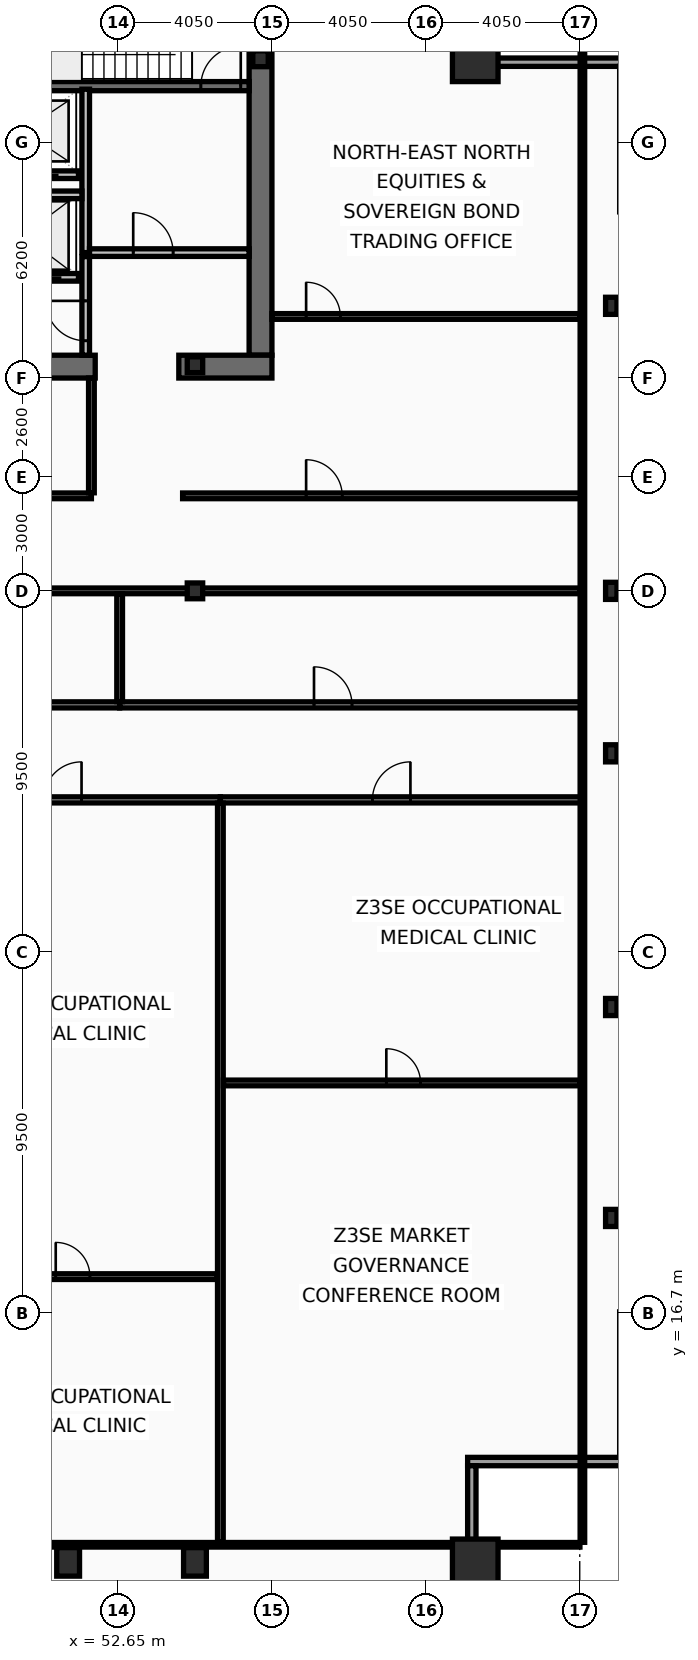
"""IFC4 building model, lengths in metres.
Left out: names, types, materials, properties, quantities, classifications, styles, units other than length and angle.
Written with IfcOpenShell. Run it as: python <this file> out.ifc"""

import sys

from ifc_helpers import new_model, si_unit, direction, frame, frame_2d, origin, origin_2d, place, context, subcontext, project, spatial, rectangle, hollow_rectangle, i_section, extrude, element, fill, save


model = new_model("IFC4")
c1 = context("Model", 3, precision=1e-05, world=origin(), true_north=direction((0.0, 1.0)))
c2 = subcontext(c1, "Body", "Model", "MODEL_VIEW")
j1 = project(units=[si_unit("LENGTHUNIT", "METRE"), si_unit("PLANEANGLEUNIT", "RADIAN")], contexts=[c1])
p1 = place(None, origin())
s1 = spatial("IfcSite", under=j1, at=p1, CompositionType="ELEMENT")
p2 = place(p1, origin())
s2 = spatial("IfcBuilding", under=s1, at=p2, CompositionType="ELEMENT")
p3 = place(p2, frame((0.0, 0.0, 221.0)))
s3 = spatial("IfcBuildingStorey", under=s2, at=p3, CompositionType="ELEMENT", Elevation=221.0)
p4 = place(p3, frame((56.4, 53.1, 0.0), z_axis=(0.0, 0.0, 1.0), x_axis=(0.0, -1.0, 0.0)))
e1 = element("IfcWall", 1, at=p4, inside=s3, PredefinedType="SHEAR", context=c2, shape_type="SweptSolid", body=[
    extrude(rectangle(XDim=11.2, YDim=0.6, at=frame_2d((5.6, 0.0))), origin(), (0.0, 0.0, 1.0), 3.44),
])
p5 = place(p3, frame((52.05, 41.6, 0.0), z_axis=(0.0, 0.0, 1.0), x_axis=(-1.0, 0.0, 0.0)))
e2 = element("IfcWall", 2, at=p5, inside=s3, PredefinedType="SHEAR", context=c2, shape_type="SweptSolid", body=[
    extrude(rectangle(XDim=11.3, YDim=0.6, at=frame_2d((5.65, 0.0))), origin(), (0.0, 0.0, 1.0), 3.44),
])
p6 = place(p3, frame((56.7, 41.6, 0.0), z_axis=(0.0, 0.0, 1.0), x_axis=(-1.0, 0.0, 0.0)))
e3 = element("IfcWall", 3, at=p6, inside=s3, PredefinedType="SHEAR", context=c2, shape_type="SweptSolid", body=[
    extrude(rectangle(XDim=2.45, YDim=0.6, at=frame_2d((1.225, 0.0))), origin(), (0.0, 0.0, 1.0), 3.44),
])
p7 = place(p3, frame((48.63, 48.98, 0.0), z_axis=(0.0, 0.0, 1.0), x_axis=(1.0, 0.0, 0.0)))
e4 = element("IfcWall", 4, at=p7, inside=s3, PredefinedType="SHEAR", context=c2, shape_type="SweptSolid", body=[
    extrude(rectangle(XDim=7.47, YDim=0.24, at=frame_2d((3.735, 0.0))), origin(), (0.0, 0.0, 1.0), 3.44),
])
p8 = place(p7, frame((6.2, 0.0, 0.0)))
e5 = element("IfcOpeningElement", 5, at=p8, cuts=e4, PredefinedType="OPENING", context=c2, shape_type="SweptSolid", body=[
    extrude(rectangle(XDim=1.05, YDim=2.15, at=frame_2d((0.525, 1.075))), frame((0.0, 0.13, 0.0), z_axis=(0.0, -1.0, 0.0), x_axis=(1.0, 0.0, 0.0)), (0.0, 0.0, 1.0), 0.26),
])
for number, where, z_axis, x_axis in (
    (6, (62.05, 10.15, 0.0), (0.0, 0.0, 1.0), (1.0, 0.0, 0.0)),
    (7, (62.05, 49.7, 0.0), (0.0, 0.0, 1.0), (1.0, 0.0, 0.0)),
):
    element("IfcColumn", number, at=place(p3, frame(where, z_axis=z_axis, x_axis=x_axis)), inside=s3, PredefinedType="COLUMN", context=c2, shape_type="SweptSolid", body=[
        extrude(hollow_rectangle(XDim=1.2, YDim=1.2, WallThickness=0.06, at=origin_2d()), origin(), (0.0, 0.0, 1.0), 3.6),
    ])
for number, where, z_axis, x_axis in (
    (8, (51.337, 10.15, 0.0), (0.0, 0.0, 1.0), (1.0, 0.0, 0.0)),
    (9, (54.675, 10.15, 0.0), (0.0, 0.0, 1.0), (1.0, 0.0, 0.0)),
):
    element("IfcColumn", number, at=place(p3, frame(where, z_axis=z_axis, x_axis=x_axis)), inside=s3, PredefinedType="COLUMN", context=c2, shape_type="SweptSolid", body=[
        extrude(hollow_rectangle(XDim=0.6, YDim=0.75, WallThickness=0.045, at=origin_2d()), origin(), (0.0, 0.0, 1.0), 3.6),
    ])
for number, where, z_axis, x_axis in (
    (10, (65.63, 19.2, 0.0), (0.0, 0.0, 1.0), (1.0, 0.0, 0.0)),
    (11, (65.63, 24.75, 0.0), (0.0, 0.0, 1.0), (1.0, 0.0, 0.0)),
    (12, (65.63, 31.425, 0.0), (0.0, 0.0, 1.0), (1.0, 0.0, 0.0)),
    (13, (65.63, 35.7, 0.0), (0.0, 0.0, 1.0), (1.0, 0.0, 0.0)),
    (14, (65.63, 43.2, 0.0), (0.0, 0.0, 1.0), (1.0, 0.0, 0.0)),
):
    element("IfcColumn", number, at=place(p3, frame(where, z_axis=z_axis, x_axis=x_axis)), inside=s3, PredefinedType="COLUMN", context=c2, shape_type="SweptSolid", body=[
        extrude(i_section(OverallWidth=0.3, OverallDepth=0.45, WebThickness=0.014, FlangeThickness=0.026, at=origin_2d()), origin(), (0.0, 0.0, 1.0), 3.6),
    ])
for number, where, z_axis, x_axis in (
    (15, (56.4, 49.7, 0.0), (0.0, 0.0, 1.0), (1.0, 0.0, 0.0)),
    (16, (54.675, 35.7, 0.0), (0.0, 0.0, 1.0), (1.0, 0.0, 0.0)),
    (17, (54.675, 41.65, 0.0), (0.0, 0.0, 1.0), (1.0, 0.0, 0.0)),
):
    element("IfcColumn", number, at=place(p3, frame(where, z_axis=z_axis, x_axis=x_axis)), inside=s3, PredefinedType="COLUMN", context=c2, shape_type="SweptSolid", body=[
        extrude(i_section(OverallWidth=0.406, OverallDepth=0.416, WebThickness=0.03, FlangeThickness=0.048, at=origin_2d()), origin(), (0.0, 0.0, 1.0), 3.6),
    ])
p9 = place(p3, frame((61.96, 53.63, 0.0), z_axis=(0.0, 0.0, 1.0), x_axis=(0.0, -1.0, 0.0)))
e18 = element("IfcWall", 18, at=p9, inside=s3, PredefinedType="SOLIDWALL", context=c2, shape_type="SweptSolid", body=[
    extrude(rectangle(XDim=3.91, YDim=0.22, at=frame_2d((1.955, 0.0))), origin(), (0.0, 0.0, 1.0), 2.83),
])
for number, where, z_axis, x_axis in (
    (19, (61.85, 49.61, 0.0), (0.0, 0.0, 1.0), (1.0, 0.0, 0.0)),
    (20, (66.07, 12.79, 0.0), (0.0, 0.0, 1.0), (-1.0, 0.0, 0.0)),
):
    element("IfcWall", number, at=place(p3, frame(where, z_axis=z_axis, x_axis=x_axis)), inside=s3, PredefinedType="SOLIDWALL", context=c2, shape_type="SweptSolid", body=[
        extrude(rectangle(XDim=4.22, YDim=0.22, at=frame_2d((2.11, 0.0))), origin(), (0.0, 0.0, 1.0), 2.83),
    ])
p10 = place(p3, frame((61.96, 12.68, 0.0), z_axis=(0.0, 0.0, 1.0), x_axis=(0.0, -1.0, 0.0)))
e21 = element("IfcWall", 21, at=p10, inside=s3, PredefinedType="SOLIDWALL", context=c2, shape_type="SweptSolid", body=[
    extrude(rectangle(XDim=3.91, YDim=0.22, at=frame_2d((1.955, 0.0))), origin(), (0.0, 0.0, 1.0), 2.83),
])
p11 = place(p3, frame((51.61, 43.95, 0.0), z_axis=(0.0, 0.0, 1.0), x_axis=(-1.0, 0.0, 0.0)))
e22 = element("IfcWall", 22, at=p11, inside=s3, PredefinedType="PARTITIONING", context=c2, shape_type="SweptSolid", body=[
    extrude(rectangle(XDim=2.92, YDim=0.2, at=frame_2d((1.46, 0.0))), origin(), (0.0, 0.0, 1.0), 3.44),
])
p12 = place(p11, frame((0.81, 0.0, 0.0)))
e23 = element("IfcOpeningElement", 23, at=p12, cuts=e22, PredefinedType="OPENING", context=c2, shape_type="SweptSolid", body=[
    extrude(rectangle(XDim=1.3, YDim=2.18, at=frame_2d((0.65, 1.09))), frame((0.0, 0.11, 0.0), z_axis=(0.0, -1.0, 0.0), x_axis=(1.0, 0.0, 0.0)), (0.0, 0.0, 1.0), 0.22),
])
p13 = place(p3, frame((51.61, 46.65, 0.0), z_axis=(0.0, 0.0, 1.0), x_axis=(-1.0, 0.0, 0.0)))
e24 = element("IfcWall", 24, at=p13, inside=s3, PredefinedType="PARTITIONING", context=c2, shape_type="SweptSolid", body=[
    extrude(rectangle(XDim=2.92, YDim=0.2, at=frame_2d((1.46, 0.0))), origin(), (0.0, 0.0, 1.0), 3.44),
])
p14 = place(p13, frame((0.86, 0.0, 0.0)))
e25 = element("IfcOpeningElement", 25, at=p14, cuts=e24, PredefinedType="OPENING", context=c2, shape_type="SweptSolid", body=[
    extrude(rectangle(XDim=1.2, YDim=2.18, at=frame_2d((0.6, 1.09))), frame((0.0, 0.11, 0.0), z_axis=(0.0, -1.0, 0.0), x_axis=(1.0, 0.0, 0.0)), (0.0, 0.0, 1.0), 0.22),
])
p15 = place(p3, frame((51.8, 44.6, 0.0), z_axis=(0.0, 0.0, 1.0), x_axis=(0.0, 1.0, 0.0)))
e26 = element("IfcWall", 26, at=p15, inside=s3, PredefinedType="PARTITIONING", context=c2, shape_type="SweptSolid", body=[
    extrude(rectangle(XDim=4.3, YDim=0.2, at=frame_2d((2.15, 0.0))), origin(), (0.0, 0.0, 1.0), 3.44),
])
p16 = place(p3, frame((51.9, 44.6, 0.0), z_axis=(0.0, 0.0, 1.0), x_axis=(1.0, 0.0, 0.0)))
e27 = element("IfcWall", 27, at=p16, inside=s3, PredefinedType="PARTITIONING", context=c2, shape_type="SweptSolid", body=[
    extrude(rectangle(XDim=4.2, YDim=0.2, at=frame_2d((2.1, 0.0))), origin(), (0.0, 0.0, 1.0), 3.44),
])
p17 = place(p16, frame((1.15, 0.0, 0.0)))
e28 = element("IfcOpeningElement", 28, at=p17, cuts=e27, PredefinedType="OPENING", context=c2, shape_type="SweptSolid", body=[
    extrude(rectangle(XDim=1.05, YDim=2.15, at=frame_2d((0.525, 1.075))), frame((0.0, 0.11, 0.0), z_axis=(0.0, -1.0, 0.0), x_axis=(1.0, 0.0, 0.0)), (0.0, 0.0, 1.0), 0.22),
])
p18 = place(p3, frame((48.63, 46.12, 0.0), z_axis=(0.0, 0.0, 1.0), x_axis=(1.0, 0.0, 0.0)))
e29 = element("IfcWall", 29, at=p18, inside=s3, PredefinedType="PARTITIONING", context=c2, shape_type="SweptSolid", body=[
    extrude(rectangle(XDim=3.07, YDim=0.2, at=frame_2d((1.535, 0.0))), origin(), (0.0, 0.0, 1.0), 3.44),
])
p19 = place(p3, frame((51.8, 41.9, 0.0), z_axis=(0.0, 0.0, 1.0), x_axis=(0.0, 1.0, 0.0)))
e30 = element("IfcWall", 30, at=p19, inside=s3, PredefinedType="PARTITIONING", context=c2, shape_type="SweptSolid", body=[
    extrude(rectangle(XDim=2.595, YDim=0.2, at=frame_2d((1.298, 0.0))), origin(), (0.0, 0.0, 1.0), 3.44),
])
p20 = place(p19, frame((0.38, 0.0, 0.0)))
e31 = element("IfcOpeningElement", 31, at=p20, cuts=e30, PredefinedType="OPENING", context=c2, shape_type="SweptSolid", body=[
    extrude(rectangle(XDim=1.05, YDim=2.15, at=frame_2d((0.525, 1.075))), frame((0.0, 0.11, 0.0), z_axis=(0.0, -1.0, 0.0), x_axis=(1.0, 0.0, 0.0)), (0.0, 0.0, 1.0), 0.22),
])
p21 = place(p3, frame((47.8, 38.2, 0.0), z_axis=(0.0, 0.0, 1.0), x_axis=(1.0, 0.0, 0.0)))
e32 = element("IfcWall", 32, at=p21, inside=s3, PredefinedType="PARTITIONING", context=c2, shape_type="SweptSolid", body=[
    extrude(rectangle(XDim=4.15, YDim=0.15, at=frame_2d((2.075, 0.0))), origin(), (0.0, 0.0, 1.0), 2.78),
])
p22 = place(p21, frame((1.1, 0.0, 0.0)))
e33 = element("IfcOpeningElement", 33, at=p22, cuts=e32, PredefinedType="OPENING", context=c2, shape_type="SweptSolid", body=[
    extrude(rectangle(XDim=1.0, YDim=2.05, at=frame_2d((0.5, 1.025))), frame((0.0, 0.085, 0.0), z_axis=(0.0, -1.0, 0.0), x_axis=(1.0, 0.0, 0.0)), (0.0, 0.0, 1.0), 0.17),
])
p23 = place(p3, frame((51.95, 38.28, 0.0), z_axis=(0.0, 0.0, 1.0), x_axis=(0.0, 1.0, 0.0)))
e34 = element("IfcWall", 34, at=p23, inside=s3, PredefinedType="PARTITIONING", context=c2, shape_type="SweptSolid", body=[
    extrude(rectangle(XDim=3.02, YDim=0.15, at=frame_2d((1.51, 0.0))), origin(), (0.0, 0.0, 1.0), 3.44),
])
p24 = place(p3, frame((54.35, 38.2, 0.0), z_axis=(0.0, 0.0, 1.0), x_axis=(1.0, 0.0, 0.0)))
e35 = element("IfcWall", 35, at=p24, inside=s3, PredefinedType="PARTITIONING", context=c2, shape_type="SweptSolid", body=[
    extrude(rectangle(XDim=10.52, YDim=0.15, at=frame_2d((5.26, 0.0))), origin(), (0.0, 0.0, 1.0), 2.78),
])
p25 = place(p24, frame((3.25, 0.0, 0.0)))
e36 = element("IfcOpeningElement", 36, at=p25, cuts=e35, PredefinedType="OPENING", context=c2, shape_type="SweptSolid", body=[
    extrude(rectangle(XDim=0.95, YDim=2.05, at=frame_2d((0.475, 1.025))), frame((0.0, 0.085, 0.0), z_axis=(0.0, -1.0, 0.0), x_axis=(1.0, 0.0, 0.0)), (0.0, 0.0, 1.0), 0.17),
])
p26 = place(p3, frame((56.7, 42.92, 0.0), z_axis=(0.0, 0.0, 1.0), x_axis=(1.0, 0.0, 0.0)))
e37 = element("IfcWall", 37, at=p26, inside=s3, PredefinedType="PARTITIONING", context=c2, shape_type="SweptSolid", body=[
    extrude(rectangle(XDim=8.105, YDim=0.15, at=frame_2d((4.052, 0.0))), origin(), (0.0, 0.0, 1.0), 2.78),
])
p27 = place(p26, frame((0.9, 0.0, 0.0)))
e38 = element("IfcOpeningElement", 38, at=p27, cuts=e37, PredefinedType="OPENING", context=c2, shape_type="SweptSolid", body=[
    extrude(rectangle(XDim=0.9, YDim=2.05, at=frame_2d((0.45, 1.025))), frame((0.0, 0.085, 0.0), z_axis=(0.0, -1.0, 0.0), x_axis=(1.0, 0.0, 0.0)), (0.0, 0.0, 1.0), 0.17),
])
p28 = place(p3, frame((39.88, 35.7, 0.0), z_axis=(0.0, 0.0, 1.0), x_axis=(1.0, 0.0, 0.0)))
e39 = element("IfcWall", 39, at=p28, inside=s3, PredefinedType="PARTITIONING", context=c2, shape_type="SweptSolid", body=[
    extrude(rectangle(XDim=24.925, YDim=0.15, at=frame_2d((12.462, 0.0))), origin(), (0.0, 0.0, 1.0), 2.78),
])
p29 = place(p3, frame((47.321, 30.2, 0.0), z_axis=(0.0, 0.0, 1.0), x_axis=(1.0, 0.0, 0.0)))
e40 = element("IfcWall", 40, at=p29, inside=s3, PredefinedType="PARTITIONING", context=c2, shape_type="SweptSolid", body=[
    extrude(rectangle(XDim=8.022, YDim=0.16, at=frame_2d((4.011, 0.0))), origin(), (0.0, 0.0, 1.0), 2.78),
])
p30 = place(p29, frame((3.369, 0.0, 0.0)))
e41 = element("IfcOpeningElement", 41, at=p30, cuts=e40, PredefinedType="OPENING", context=c2, shape_type="SweptSolid", body=[
    extrude(rectangle(XDim=1.0, YDim=2.05, at=frame_2d((0.5, 1.025))), frame((0.0, 0.09, 0.0), z_axis=(0.0, -1.0, 0.0), x_axis=(1.0, 0.0, 0.0)), (0.0, 0.0, 1.0), 0.18),
])
p31 = place(p3, frame((47.401, 17.656, 0.0), z_axis=(0.0, 0.0, 1.0), x_axis=(1.0, 0.0, 0.0)))
e42 = element("IfcWall", 42, at=p31, inside=s3, PredefinedType="PARTITIONING", context=c2, shape_type="SweptSolid", body=[
    extrude(rectangle(XDim=7.863, YDim=0.15, at=frame_2d((3.931, 0.0))), origin(), (0.0, 0.0, 1.0), 2.78),
])
p32 = place(p31, frame((3.61, 0.0, 0.0)))
e43 = element("IfcOpeningElement", 43, at=p32, cuts=e42, PredefinedType="OPENING", context=c2, shape_type="SweptSolid", body=[
    extrude(rectangle(XDim=0.9, YDim=2.05, at=frame_2d((0.45, 1.025))), frame((0.0, 0.085, 0.0), z_axis=(0.0, -1.0, 0.0), x_axis=(1.0, 0.0, 0.0)), (0.0, 0.0, 1.0), 0.17),
])
p33 = place(p3, frame((55.344, 30.2, 0.0), z_axis=(0.0, 0.0, 1.0), x_axis=(1.0, 0.0, 0.0)))
e44 = element("IfcWall", 44, at=p33, inside=s3, PredefinedType="PARTITIONING", context=c2, shape_type="SweptSolid", body=[
    extrude(rectangle(XDim=9.527, YDim=0.16, at=frame_2d((4.763, 0.0))), origin(), (0.0, 0.0, 1.0), 3.44),
])
p34 = place(p33, frame((4.001, 0.0, 0.0)))
e45 = element("IfcOpeningElement", 45, at=p34, cuts=e44, PredefinedType="OPENING", context=c2, shape_type="SweptSolid", body=[
    extrude(rectangle(XDim=1.0, YDim=2.05, at=frame_2d((0.5, 1.025))), frame((0.0, 0.09, 0.0), z_axis=(0.0, -1.0, 0.0), x_axis=(1.0, 0.0, 0.0)), (0.0, 0.0, 1.0), 0.18),
])
p35 = place(p3, frame((55.344, 10.665, 0.0), z_axis=(0.0, 0.0, 1.0), x_axis=(0.0, 1.0, 0.0)))
e46 = element("IfcWall", 46, at=p35, inside=s3, PredefinedType="PARTITIONING", context=c2, shape_type="SweptSolid", body=[
    extrude(rectangle(XDim=19.45, YDim=0.15, at=frame_2d((9.725, 0.0))), origin(), (0.0, 0.0, 1.0), 2.78),
])
p36 = place(p3, frame((55.423, 22.752, 0.0), z_axis=(0.0, 0.0, 1.0), x_axis=(1.0, 0.0, 0.0)))
e47 = element("IfcWall", 47, at=p36, inside=s3, PredefinedType="PARTITIONING", context=c2, shape_type="SweptSolid", body=[
    extrude(rectangle(XDim=9.382, YDim=0.15, at=frame_2d((4.691, 0.0))), origin(), (0.0, 0.0, 1.0), 3.44),
])
p37 = place(p36, frame((4.287, 0.0, 0.0)))
e48 = element("IfcOpeningElement", 48, at=p37, cuts=e47, PredefinedType="OPENING", context=c2, shape_type="SweptSolid", body=[
    extrude(rectangle(XDim=0.9, YDim=2.05, at=frame_2d((0.45, 1.025))), frame((0.0, 0.085, 0.0), z_axis=(0.0, -1.0, 0.0), x_axis=(1.0, 0.0, 0.0)), (0.0, 0.0, 1.0), 0.17),
])
p38 = place(p3, frame((39.8, 32.7, 0.0), z_axis=(0.0, 0.0, 1.0), x_axis=(1.0, 0.0, 0.0)))
e49 = element("IfcWall", 49, at=p38, inside=s3, PredefinedType="PARTITIONING", context=c2, shape_type="SweptSolid", body=[
    extrude(rectangle(XDim=12.893, YDim=0.16, at=frame_2d((6.447, 0.0))), origin(), (0.0, 0.0, 1.0), 2.78),
])
p39 = place(p38, frame((5.415, 0.0, 0.0)))
e50 = element("IfcOpeningElement", 50, at=p39, cuts=e49, PredefinedType="OPENING", context=c2, shape_type="SweptSolid", body=[
    extrude(rectangle(XDim=1.0, YDim=2.05, at=frame_2d((0.5, 1.025))), frame((0.0, 0.09, 0.0), z_axis=(0.0, -1.0, 0.0), x_axis=(1.0, 0.0, 0.0)), (0.0, 0.0, 1.0), 0.18),
])
p40 = place(p3, frame((52.693, 32.7, 0.0), z_axis=(0.0, 0.0, 1.0), x_axis=(1.0, 0.0, 0.0)))
e51 = element("IfcWall", 51, at=p40, inside=s3, PredefinedType="PARTITIONING", context=c2, shape_type="SweptSolid", body=[
    extrude(rectangle(XDim=12.177, YDim=0.16, at=frame_2d((6.088, 0.0))), origin(), (0.0, 0.0, 1.0), 2.78),
])
p41 = place(p40, frame((5.114, 0.0, 0.0)))
e52 = element("IfcOpeningElement", 52, at=p41, cuts=e51, PredefinedType="OPENING", context=c2, shape_type="SweptSolid", body=[
    extrude(rectangle(XDim=1.0, YDim=2.05, at=frame_2d((0.5, 1.025))), frame((0.0, 0.09, 0.0), z_axis=(0.0, -1.0, 0.0), x_axis=(1.0, 0.0, 0.0)), (0.0, 0.0, 1.0), 0.18),
])
p42 = place(p3, frame((52.693, 32.785, 0.0), z_axis=(0.0, 0.0, 1.0), x_axis=(0.0, 1.0, 0.0)))
e53 = element("IfcWall", 53, at=p42, inside=s3, PredefinedType="PARTITIONING", context=c2, shape_type="SweptSolid", body=[
    extrude(rectangle(XDim=2.835, YDim=0.15, at=frame_2d((1.417, 0.0))), origin(), (0.0, 0.0, 1.0), 2.98),
])
p43 = place(p3, frame((64.87, 10.665, 0.0), z_axis=(0.0, 0.0, 1.0), x_axis=(0.0, 1.0, 0.0)))
e54 = element("IfcWall", 54, at=p43, inside=s3, PredefinedType="PARTITIONING", context=c2, shape_type="SweptSolid", body=[
    extrude(rectangle(XDim=42.11, YDim=0.12, at=frame_2d((21.055, 0.0))), origin(), (0.0, 0.0, 1.0), 2.78),
])
p44 = place(p3, frame((8.095, 10.6, 0.0), z_axis=(0.0, 0.0, 1.0), x_axis=(1.0, 0.0, 0.0)))
e55 = element("IfcWall", 55, at=p44, inside=s3, PredefinedType="PARTITIONING", context=c2, shape_type="SweptSolid", body=[
    extrude(rectangle(XDim=56.71, YDim=0.12, at=frame_2d((28.355, 0.0))), origin(), (0.0, 0.0, 1.0), 2.78),
])
p45 = place(p8, origin())
e56 = element("IfcDoor", 56, at=p45, inside=s3, OperationType="SINGLE_SWING_RIGHT", PredefinedType="DOOR", context=c2, shape_type="SweptSolid", body=[
    extrude(rectangle(XDim=1.05, YDim=2.15, at=frame_2d((0.525, 1.075))), frame((0.0, 0.025, 0.0), z_axis=(0.0, -1.0, 0.0), x_axis=(1.0, 0.0, 0.0)), (0.0, 0.0, 1.0), 0.05),
])
fill(e5, e56)
p46 = place(p17, origin())
e57 = element("IfcDoor", 57, at=p46, inside=s3, OperationType="SINGLE_SWING_LEFT", PredefinedType="DOOR", context=c2, shape_type="SweptSolid", body=[
    extrude(rectangle(XDim=1.05, YDim=2.15, at=frame_2d((0.525, 1.075))), frame((0.0, 0.025, 0.0), z_axis=(0.0, -1.0, 0.0), x_axis=(1.0, 0.0, 0.0)), (0.0, 0.0, 1.0), 0.05),
])
fill(e28, e57)
p47 = place(p20, origin())
e58 = element("IfcDoor", 58, at=p47, inside=s3, OperationType="SINGLE_SWING_RIGHT", PredefinedType="DOOR", context=c2, shape_type="SweptSolid", body=[
    extrude(rectangle(XDim=1.05, YDim=2.15, at=frame_2d((0.525, 1.075))), frame((0.0, 0.025, 0.0), z_axis=(0.0, -1.0, 0.0), x_axis=(1.0, 0.0, 0.0)), (0.0, 0.0, 1.0), 0.05),
])
fill(e31, e58)
p48 = place(p25, origin())
e59 = element("IfcDoor", 59, at=p48, inside=s3, OperationType="SINGLE_SWING_LEFT", PredefinedType="DOOR", context=c2, shape_type="SweptSolid", body=[
    extrude(rectangle(XDim=0.95, YDim=2.05, at=frame_2d((0.475, 1.025))), frame((0.0, 0.025, 0.0), z_axis=(0.0, -1.0, 0.0), x_axis=(1.0, 0.0, 0.0)), (0.0, 0.0, 1.0), 0.05),
])
fill(e36, e59)
p49 = place(p27, origin())
e60 = element("IfcDoor", 60, at=p49, inside=s3, OperationType="SINGLE_SWING_LEFT", PredefinedType="DOOR", context=c2, shape_type="SweptSolid", body=[
    extrude(rectangle(XDim=0.9, YDim=2.05, at=frame_2d((0.45, 1.025))), frame((0.0, 0.025, 0.0), z_axis=(0.0, -1.0, 0.0), x_axis=(1.0, 0.0, 0.0)), (0.0, 0.0, 1.0), 0.05),
])
fill(e38, e60)
p50 = place(p30, origin())
e61 = element("IfcDoor", 61, at=p50, inside=s3, OperationType="SINGLE_SWING_RIGHT", PredefinedType="DOOR", context=c2, shape_type="SweptSolid", body=[
    extrude(rectangle(XDim=1.0, YDim=2.05, at=frame_2d((0.5, 1.025))), frame((0.0, 0.025, 0.0), z_axis=(0.0, -1.0, 0.0), x_axis=(1.0, 0.0, 0.0)), (0.0, 0.0, 1.0), 0.05),
])
fill(e41, e61)
p51 = place(p32, origin())
e62 = element("IfcDoor", 62, at=p51, inside=s3, OperationType="SINGLE_SWING_LEFT", PredefinedType="DOOR", context=c2, shape_type="SweptSolid", body=[
    extrude(rectangle(XDim=0.9, YDim=2.05, at=frame_2d((0.45, 1.025))), frame((0.0, 0.025, 0.0), z_axis=(0.0, -1.0, 0.0), x_axis=(1.0, 0.0, 0.0)), (0.0, 0.0, 1.0), 0.05),
])
fill(e43, e62)
p52 = place(p34, origin())
e63 = element("IfcDoor", 63, at=p52, inside=s3, OperationType="SINGLE_SWING_RIGHT", PredefinedType="DOOR", context=c2, shape_type="SweptSolid", body=[
    extrude(rectangle(XDim=1.0, YDim=2.05, at=frame_2d((0.5, 1.025))), frame((0.0, 0.025, 0.0), z_axis=(0.0, -1.0, 0.0), x_axis=(1.0, 0.0, 0.0)), (0.0, 0.0, 1.0), 0.05),
])
fill(e45, e63)
p53 = place(p37, origin())
e64 = element("IfcDoor", 64, at=p53, inside=s3, OperationType="SINGLE_SWING_LEFT", PredefinedType="DOOR", context=c2, shape_type="SweptSolid", body=[
    extrude(rectangle(XDim=0.9, YDim=2.05, at=frame_2d((0.45, 1.025))), frame((0.0, 0.025, 0.0), z_axis=(0.0, -1.0, 0.0), x_axis=(1.0, 0.0, 0.0)), (0.0, 0.0, 1.0), 0.05),
])
fill(e48, e64)
p54 = place(p41, origin())
e65 = element("IfcDoor", 65, at=p54, inside=s3, OperationType="SINGLE_SWING_LEFT", PredefinedType="DOOR", context=c2, shape_type="SweptSolid", body=[
    extrude(rectangle(XDim=1.0, YDim=2.05, at=frame_2d((0.5, 1.025))), frame((0.0, 0.025, 0.0), z_axis=(0.0, -1.0, 0.0), x_axis=(1.0, 0.0, 0.0)), (0.0, 0.0, 1.0), 0.05),
])
fill(e52, e65)
save(model, sys.argv[1])
